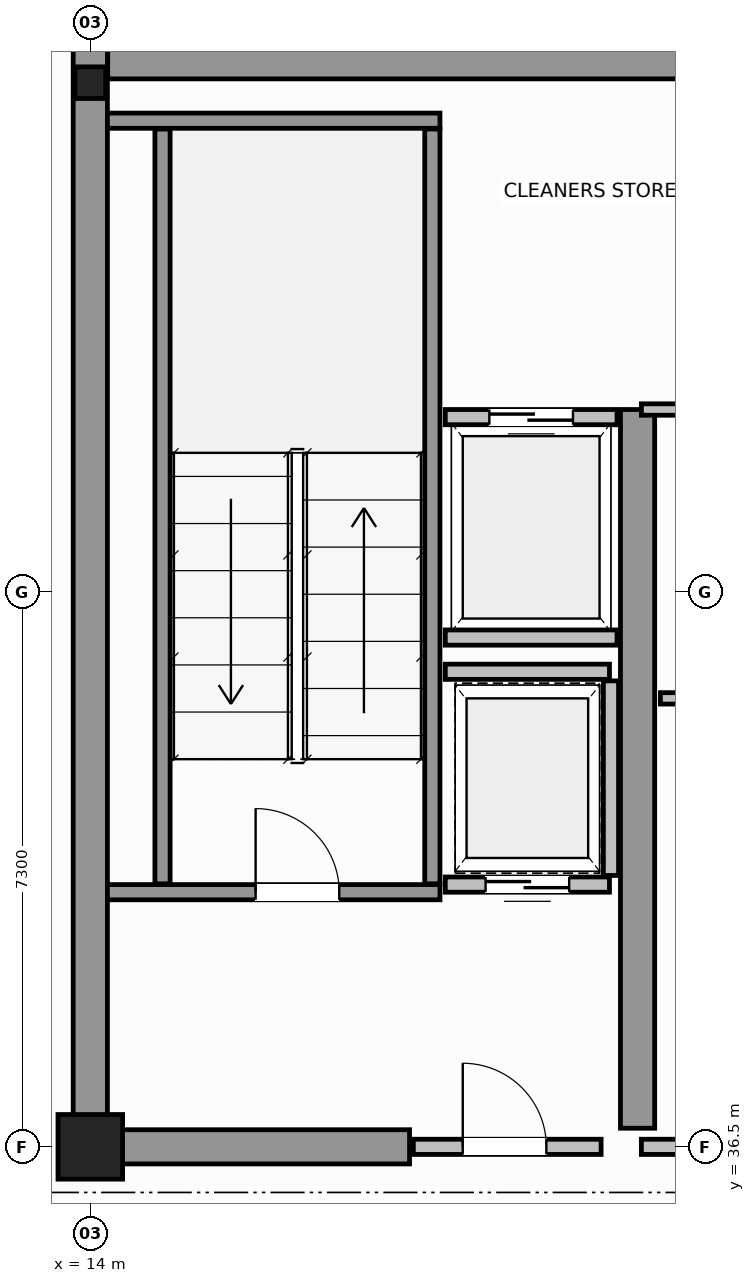
"""IFC4 building model, lengths in metres.
Left out: names, types, materials, properties, quantities, classifications, styles, units other than length and angle.
Written with IfcOpenShell. Run it as: python <this file> out.ifc"""

import sys

from ifc_helpers import new_model, si_unit, direction, frame, frame_2d, origin, origin_2d, place, context, subcontext, project, spatial, rectangle, i_section, extrude, source, transform, mapped, element, fill, save


model = new_model("IFC4")
c1 = context("Model", 3, precision=1e-05, world=origin(), true_north=direction((0.0, 1.0)))
c2 = subcontext(c1, "Body", "Model", "MODEL_VIEW")
j1 = project(units=[si_unit("LENGTHUNIT", "METRE"), si_unit("PLANEANGLEUNIT", "RADIAN")], contexts=[c1])
p1 = place(None, origin())
s1 = spatial("IfcSite", under=j1, at=p1, CompositionType="ELEMENT")
p2 = place(p1, origin())
s2 = spatial("IfcBuilding", under=s1, at=p2, CompositionType="ELEMENT")
p3 = place(p2, frame((0.0, 0.0, 308.4)))
s3 = spatial("IfcBuildingStorey", under=s2, at=p3, CompositionType="ELEMENT", Elevation=308.4)
m1 = source(origin(), c2, "Body", "SweptSolid", [
    extrude(rectangle(XDim=0.85, YDim=0.85, at=origin_2d()), origin(), (0.0, 0.0, 1.0), 4.4),
])
p4 = place(p3, frame((14.0, 36.5, 0.0), z_axis=(0.0, 0.0, 1.0), x_axis=(1.0, 0.0, 0.0)))
e1 = element("IfcColumn", 1, at=p4, inside=s3, PredefinedType="COLUMN", context=c2, shape_type="MappedRepresentation", body=[
    mapped(m1, transform((0.0, 0.0, 0.0), scale=1.0)),
])
m2 = source(origin(), c2, "Body", "SweptSolid", [
    extrude(i_section(OverallWidth=0.406, OverallDepth=0.416, WebThickness=0.03, FlangeThickness=0.042, FilletRadius=0.015, at=origin_2d()), origin(), (0.0, 0.0, 1.0), 4.4),
])
p5 = place(p3, frame((14.0, 50.5, 0.0), z_axis=(0.0, 0.0, 1.0), x_axis=(1.0, 0.0, 0.0)))
e2 = element("IfcColumn", 2, at=p5, inside=s3, PredefinedType="COLUMN", context=c2, shape_type="MappedRepresentation", body=[
    mapped(m2, transform((0.0, 0.0, 0.0), scale=1.0)),
])
p6 = place(p3, frame((14.229, 50.775, 0.0), z_axis=(0.0, 0.0, 1.0), x_axis=(1.0, 0.0, 0.0)))
e3 = element("IfcWall", 3, at=p6, inside=s3, PredefinedType="SHEAR", context=c2, shape_type="SweptSolid", body=[
    extrude(rectangle(XDim=19.769, YDim=0.45, at=frame_2d((9.885, 0.0))), origin(), (0.0, 0.0, 1.0), 4.4),
])
p7 = place(p3, frame((14.0, 36.5, 0.0), z_axis=(0.0, 0.0, 1.0), x_axis=(0.0, 1.0, 0.0)))
e4 = element("IfcWall", 4, at=p7, inside=s3, PredefinedType="SHEAR", context=c2, shape_type="SweptSolid", body=[
    extrude(rectangle(XDim=14.5, YDim=0.45, at=frame_2d((7.25, 0.0))), origin(), (0.0, 0.0, 1.0), 4.4),
])
p8 = place(p3, frame((14.245, 36.5, 0.0), z_axis=(0.0, 0.0, 1.0), x_axis=(1.0, 0.0, 0.0)))
e5 = element("IfcWall", 5, at=p8, inside=s3, PredefinedType="SHEAR", context=c2, shape_type="SweptSolid", body=[
    extrude(rectangle(XDim=3.955, YDim=0.45, at=frame_2d((1.978, 0.0))), origin(), (0.0, 0.0, 1.0), 3.1),
])
p9 = place(p3, frame((21.2, 36.745, 0.0), z_axis=(0.0, 0.0, 1.0), x_axis=(0.0, 1.0, 0.0)))
e6 = element("IfcWall", 6, at=p9, inside=s3, PredefinedType="SHEAR", context=c2, shape_type="SweptSolid", body=[
    extrude(rectangle(XDim=9.455, YDim=0.45, at=frame_2d((4.728, 0.0))), origin(), (0.0, 0.0, 1.0), 4.4),
])
p10 = place(p3, frame((14.225, 39.85, 0.0), z_axis=(0.0, 0.0, 1.0), x_axis=(1.0, 0.0, 0.0)))
e7 = element("IfcWall", 7, at=p10, inside=s3, PredefinedType="SOLIDWALL", context=c2, shape_type="SweptSolid", body=[
    extrude(rectangle(XDim=4.375, YDim=0.2, at=frame_2d((2.188, 0.0))), origin(), (0.0, 0.0, 1.0), 4.4),
])
p11 = place(p10, frame((1.95, 0.0, 0.0)))
e8 = element("IfcOpeningElement", 8, at=p11, cuts=e7, PredefinedType="OPENING", context=c2, shape_type="SweptSolid", body=[
    extrude(rectangle(XDim=1.1, YDim=2.15, at=frame_2d((0.55, 1.075))), frame((0.0, 0.11, 0.0), z_axis=(0.0, -1.0, 0.0), x_axis=(1.0, 0.0, 0.0)), (0.0, 0.0, 1.0), 0.22),
])
p12 = place(p3, frame((14.225, 50.0, 0.0), z_axis=(0.0, 0.0, 1.0), x_axis=(1.0, 0.0, 0.0)))
e9 = element("IfcWall", 9, at=p12, inside=s3, PredefinedType="SOLIDWALL", context=c2, shape_type="SweptSolid", body=[
    extrude(rectangle(XDim=4.375, YDim=0.2, at=frame_2d((2.188, 0.0))), origin(), (0.0, 0.0, 1.0), 4.4),
])
for number, where, z_axis, x_axis in (
    (10, (14.95, 39.96, 0.0), (0.0, 0.0, 1.0), (0.0, 1.0, 0.0)),
    (11, (18.5, 39.96, 0.0), (0.0, 0.0, 1.0), (0.0, 1.0, 0.0)),
):
    element("IfcWall", number, at=place(p3, frame(where, z_axis=z_axis, x_axis=x_axis)), inside=s3, PredefinedType="SOLIDWALL", context=c2, shape_type="SweptSolid", body=[
        extrude(rectangle(XDim=9.93, YDim=0.2, at=frame_2d((4.965, 0.0))), origin(), (0.0, 0.0, 1.0), 4.4),
    ])
p13 = place(p3, frame((18.25, 36.5, 0.0), z_axis=(0.0, 0.0, 1.0), x_axis=(1.0, 0.0, 0.0)))
e12 = element("IfcWall", 12, at=p13, inside=s3, PredefinedType="SOLIDWALL", context=c2, shape_type="SweptSolid", body=[
    extrude(rectangle(XDim=2.47, YDim=0.2, at=frame_2d((1.235, 0.0))), origin(), (0.0, 0.0, 1.0), 3.09),
])
p14 = place(p13, frame((0.65, 0.0, 0.0)))
e13 = element("IfcOpeningElement", 13, at=p14, cuts=e12, PredefinedType="OPENING", context=c2, shape_type="SweptSolid", body=[
    extrude(rectangle(XDim=1.1, YDim=2.15, at=frame_2d((0.55, 1.075))), frame((0.0, 0.11, 0.0), z_axis=(0.0, -1.0, 0.0), x_axis=(1.0, 0.0, 0.0)), (0.0, 0.0, 1.0), 0.22),
])
p15 = place(p3, frame((18.67, 46.1, 0.0), z_axis=(0.0, 0.0, 1.0), x_axis=(1.0, 0.0, 0.0)))
e14 = element("IfcWall", 14, at=p15, inside=s3, PredefinedType="SOLIDWALL", context=c2, shape_type="SweptSolid", body=[
    extrude(rectangle(XDim=2.26, YDim=0.2, at=frame_2d((1.13, 0.0))), origin(), (0.0, 0.0, 1.0), 4.1),
])
p16 = place(p15, frame((0.58, 0.0, 0.0)))
e15 = element("IfcOpeningElement", 15, at=p16, cuts=e14, PredefinedType="OPENING", context=c2, shape_type="SweptSolid", body=[
    extrude(rectangle(XDim=1.1, YDim=2.15, at=frame_2d((0.55, 1.075))), frame((0.0, 0.11, 0.0), z_axis=(0.0, -1.0, 0.0), x_axis=(1.0, 0.0, 0.0)), (0.0, 0.0, 1.0), 0.22),
])
p17 = place(p3, frame((18.67, 43.2, 0.0), z_axis=(0.0, 0.0, 1.0), x_axis=(1.0, 0.0, 0.0)))
e16 = element("IfcWall", 16, at=p17, inside=s3, PredefinedType="SOLIDWALL", context=c2, shape_type="SweptSolid", body=[
    extrude(rectangle(XDim=2.26, YDim=0.2, at=frame_2d((1.13, 0.0))), origin(), (0.0, 0.0, 1.0), 4.1),
])
p18 = place(p3, frame((18.67, 39.95, 0.0), z_axis=(0.0, 0.0, 1.0), x_axis=(1.0, 0.0, 0.0)))
e17 = element("IfcWall", 17, at=p18, inside=s3, PredefinedType="SOLIDWALL", context=c2, shape_type="SweptSolid", body=[
    extrude(rectangle(XDim=2.16, YDim=0.2, at=frame_2d((1.08, 0.0))), origin(), (0.0, 0.0, 1.0), 4.1),
])
p19 = place(p18, frame((0.53, 0.0, 0.0)))
e18 = element("IfcOpeningElement", 18, at=p19, cuts=e17, PredefinedType="OPENING", context=c2, shape_type="SweptSolid", body=[
    extrude(rectangle(XDim=1.1, YDim=2.15, at=frame_2d((0.55, 1.075))), frame((0.0, 0.11, 0.0), z_axis=(0.0, -1.0, 0.0), x_axis=(1.0, 0.0, 0.0)), (0.0, 0.0, 1.0), 0.22),
])
p20 = place(p3, frame((18.67, 42.75, 0.0), z_axis=(0.0, 0.0, 1.0), x_axis=(1.0, 0.0, 0.0)))
e19 = element("IfcWall", 19, at=p20, inside=s3, PredefinedType="SOLIDWALL", context=c2, shape_type="SweptSolid", body=[
    extrude(rectangle(XDim=2.16, YDim=0.2, at=frame_2d((1.08, 0.0))), origin(), (0.0, 0.0, 1.0), 4.1),
])
p21 = place(p3, frame((20.85, 40.07, 0.0), z_axis=(0.0, 0.0, 1.0), x_axis=(0.0, 1.0, 0.0)))
e20 = element("IfcWall", 20, at=p21, inside=s3, PredefinedType="SOLIDWALL", context=c2, shape_type="SweptSolid", body=[
    extrude(rectangle(XDim=2.56, YDim=0.2, at=frame_2d((1.28, 0.0))), origin(), (0.0, 0.0, 1.0), 4.1),
])
p22 = place(p3, frame((21.25, 36.5, 0.0), z_axis=(0.0, 0.0, 1.0), x_axis=(1.0, 0.0, 0.0)))
e21 = element("IfcWall", 21, at=p22, inside=s3, PredefinedType="SOLIDWALL", context=c2, shape_type="SweptSolid", body=[
    extrude(rectangle(XDim=6.27, YDim=0.2, at=frame_2d((3.135, 0.0))), origin(), (0.0, 0.0, 1.0), 2.89),
])
p23 = place(p22, frame((2.6, 0.0, 0.0)))
e22 = element("IfcOpeningElement", 22, at=p23, cuts=e21, PredefinedType="OPENING", context=c2, shape_type="SweptSolid", body=[
    extrude(rectangle(XDim=1.1, YDim=2.15, at=frame_2d((0.55, 1.075))), frame((0.0, 0.11, 0.0), z_axis=(0.0, -1.0, 0.0), x_axis=(1.0, 0.0, 0.0)), (0.0, 0.0, 1.0), 0.22),
])
p24 = place(p3, frame((21.25, 46.2, 0.0), z_axis=(0.0, 0.0, 1.0), x_axis=(1.0, 0.0, 0.0)))
e23 = element("IfcWall", 23, at=p24, inside=s3, PredefinedType="PARTITIONING", context=c2, shape_type="SweptSolid", body=[
    extrude(rectangle(XDim=8.5, YDim=0.15, at=frame_2d((4.25, 0.0))), origin(), (0.0, 0.0, 1.0), 4.1),
])
p25 = place(p3, frame((21.5, 42.4, 0.0), z_axis=(0.0, 0.0, 1.0), x_axis=(1.0, 0.0, 0.0)))
e24 = element("IfcWall", 24, at=p25, inside=s3, PredefinedType="PARTITIONING", context=c2, shape_type="SweptSolid", body=[
    extrude(rectangle(XDim=8.0, YDim=0.15, at=frame_2d((4.0, 0.0))), origin(), (0.0, 0.0, 1.0), 4.1),
])
p26 = place(p25, frame((3.4, 0.0, 0.0)))
e25 = element("IfcOpeningElement", 25, at=p26, cuts=e24, PredefinedType="OPENING", context=c2, shape_type="SweptSolid", body=[
    extrude(rectangle(XDim=0.9, YDim=2.1, at=frame_2d((0.45, 1.05))), frame((0.0, 0.085, 0.0), z_axis=(0.0, -1.0, 0.0), x_axis=(1.0, 0.0, 0.0)), (0.0, 0.0, 1.0), 0.17),
])
m3 = source(origin(), c2, "Body", "SweptSolid", [
    extrude(rectangle(XDim=1.1, YDim=2.15, at=frame_2d((0.55, 1.075))), frame((0.0, 0.025, 0.0), z_axis=(0.0, -1.0, 0.0), x_axis=(1.0, 0.0, 0.0)), (0.0, 0.0, 1.0), 0.05),
])
p27 = place(p11, origin())
e26 = element("IfcDoor", 26, at=p27, inside=s3, OperationType="SINGLE_SWING_LEFT", PredefinedType="DOOR", context=c2, shape_type="MappedRepresentation", body=[
    mapped(m3, transform((0.0, 0.0, 0.0), scale=1.0)),
])
fill(e8, e26)
p28 = place(p14, origin())
e27 = element("IfcDoor", 27, at=p28, inside=s3, OperationType="SINGLE_SWING_RIGHT", PredefinedType="DOOR", context=c2, shape_type="MappedRepresentation", body=[
    mapped(m3, transform((0.0, 0.0, 0.0), scale=1.0)),
])
fill(e13, e27)
p29 = place(p16, origin())
e28 = element("IfcDoor", 28, at=p29, inside=s3, OperationType="DOUBLE_DOOR_SLIDING", PredefinedType="DOOR", context=c2, shape_type="MappedRepresentation", body=[
    mapped(m3, transform((0.0, 0.0, 0.0), scale=1.0)),
])
fill(e15, e28)
p30 = place(p19, origin())
e29 = element("IfcDoor", 29, at=p30, inside=s3, OperationType="DOUBLE_DOOR_SLIDING", PredefinedType="DOOR", context=c2, shape_type="MappedRepresentation", body=[
    mapped(m3, transform((0.0, 0.0, 0.0), scale=1.0)),
])
fill(e18, e29)
save(model, sys.argv[1])
